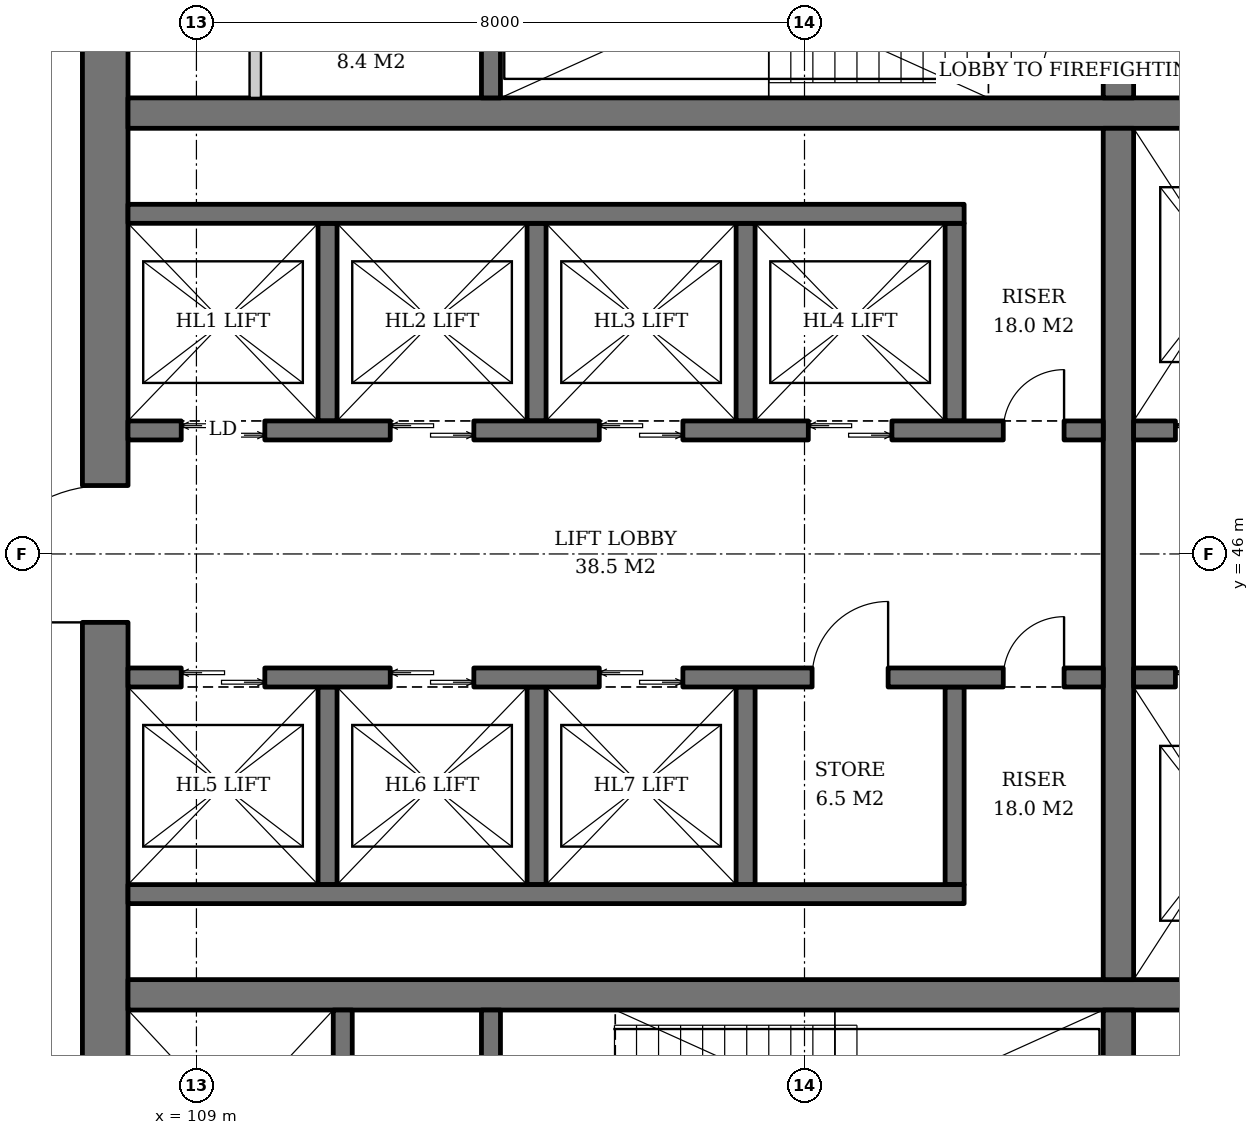
"""IFC4 building model, lengths in metres.
Left out: names, types, materials, properties, quantities, classifications, styles, units other than length and angle.
Written with IfcOpenShell. Run it as: python <this file> out.ifc"""

import sys

from ifc_helpers import new_model, si_unit, direction, frame, frame_2d, origin, place, context, subcontext, project, spatial, rectangle, extrude, element, fill, save


model = new_model("IFC4")
c1 = context("Model", 3, precision=1e-05, world=origin(), true_north=direction((0.0, 1.0)))
c2 = subcontext(c1, "Body", "Model", "MODEL_VIEW")
j1 = project(units=[si_unit("LENGTHUNIT", "METRE"), si_unit("PLANEANGLEUNIT", "RADIAN")], contexts=[c1])
p1 = place(None, origin())
s1 = spatial("IfcSite", under=j1, at=p1, CompositionType="ELEMENT")
p2 = place(p1, origin())
s2 = spatial("IfcBuilding", under=s1, at=p2, CompositionType="ELEMENT")
p3 = place(p2, frame((0.0, 0.0, 62.8)))
s3 = spatial("IfcBuildingStorey", under=s2, at=p3, CompositionType="ELEMENT", Elevation=62.8)
p4 = place(p3, frame((107.8, 37.1, 0.0), z_axis=(0.0, 0.0, 1.0), x_axis=(0.0, 1.0, 0.0)))
e1 = element("IfcWall", 1, at=p4, inside=s3, PredefinedType="SHEAR", context=c2, shape_type="SweptSolid", body=[
    extrude(rectangle(XDim=17.8, YDim=0.6, at=frame_2d((8.9, 0.0))), origin(), (0.0, 0.0, 1.0), 3.8),
])
p5 = place(p4, frame((8.0, 0.0, 0.0)))
e2 = element("IfcOpeningElement", 2, at=p5, cuts=e1, PredefinedType="OPENING", context=c2, shape_type="SweptSolid", body=[
    extrude(rectangle(XDim=1.8, YDim=2.4, at=frame_2d((0.9, 1.2))), frame((0.0, 0.31, 0.0), z_axis=(0.0, -1.0, 0.0), x_axis=(1.0, 0.0, 0.0)), (0.0, 0.0, 1.0), 0.62),
])
for number, where, z_axis, x_axis in (
    (3, (108.1, 40.2, 0.0), (0.0, 0.0, 1.0), (1.0, 0.0, 0.0)),
    (4, (108.1, 51.8, 0.0), (0.0, 0.0, 1.0), (1.0, 0.0, 0.0)),
):
    element("IfcWall", number, at=place(p3, frame(where, z_axis=z_axis, x_axis=x_axis)), inside=s3, PredefinedType="SHEAR", context=c2, shape_type="SweptSolid", body=[
        extrude(rectangle(XDim=17.8, YDim=0.4, at=frame_2d((8.9, 0.0))), origin(), (0.0, 0.0, 1.0), 3.8),
    ])
p6 = place(p3, frame((121.13, 37.1, 0.0), z_axis=(0.0, 0.0, 1.0), x_axis=(0.0, 1.0, 0.0)))
e5 = element("IfcWall", 5, at=p6, inside=s3, PredefinedType="SHEAR", context=c2, shape_type="SweptSolid", body=[
    extrude(rectangle(XDim=2.9, YDim=0.4, at=frame_2d((1.45, 0.0))), origin(), (0.0, 0.0, 1.0), 3.8),
])
p7 = place(p3, frame((121.13, 40.4, 0.0), z_axis=(0.0, 0.0, 1.0), x_axis=(0.0, 1.0, 0.0)))
e6 = element("IfcWall", 6, at=p7, inside=s3, PredefinedType="SHEAR", context=c2, shape_type="SweptSolid", body=[
    extrude(rectangle(XDim=11.2, YDim=0.4, at=frame_2d((5.6, 0.0))), origin(), (0.0, 0.0, 1.0), 3.8),
])
p8 = place(p3, frame((121.13, 52.0, 0.0), z_axis=(0.0, 0.0, 1.0), x_axis=(0.0, 1.0, 0.0)))
e7 = element("IfcWall", 7, at=p8, inside=s3, PredefinedType="SHEAR", context=c2, shape_type="SweptSolid", body=[
    extrude(rectangle(XDim=2.9, YDim=0.4, at=frame_2d((1.45, 0.0))), origin(), (0.0, 0.0, 1.0), 3.8),
])
p9 = place(p8, frame((0.3, 0.0, 0.0)))
e8 = element("IfcOpeningElement", 8, at=p9, cuts=e7, PredefinedType="OPENING", context=c2, shape_type="SweptSolid", body=[
    extrude(rectangle(XDim=1.0, YDim=2.1, at=frame_2d((0.5, 1.05))), frame((0.0, 0.21, 0.0), z_axis=(0.0, -1.0, 0.0), x_axis=(1.0, 0.0, 0.0)), (0.0, 0.0, 1.0), 0.42),
])
p10 = place(p3, frame((110.925, 37.1, 0.0), z_axis=(0.0, 0.0, 1.0), x_axis=(0.0, 1.0, 0.0)))
e9 = element("IfcWall", 9, at=p10, inside=s3, PredefinedType="SHEAR", context=c2, shape_type="SweptSolid", body=[
    extrude(rectangle(XDim=2.9, YDim=0.25, at=frame_2d((1.45, 0.0))), origin(), (0.0, 0.0, 1.0), 3.8),
])
p11 = place(p10, frame((0.8, 0.0, 0.0)))
e10 = element("IfcOpeningElement", 10, at=p11, cuts=e9, PredefinedType="OPENING", context=c2, shape_type="SweptSolid", body=[
    extrude(rectangle(XDim=1.3, YDim=2.2, at=frame_2d((0.65, 1.1))), frame((0.0, 0.135, 0.0), z_axis=(0.0, -1.0, 0.0), x_axis=(1.0, 0.0, 0.0)), (0.0, 0.0, 1.0), 0.27),
])
p12 = place(p3, frame((112.875, 37.1, 0.0), z_axis=(0.0, 0.0, 1.0), x_axis=(0.0, 1.0, 0.0)))
e11 = element("IfcWall", 11, at=p12, inside=s3, PredefinedType="SHEAR", context=c2, shape_type="SweptSolid", body=[
    extrude(rectangle(XDim=2.9, YDim=0.25, at=frame_2d((1.45, 0.0))), origin(), (0.0, 0.0, 1.0), 3.8),
])
p13 = place(p12, frame((0.75, 0.0, 0.0)))
e12 = element("IfcOpeningElement", 12, at=p13, cuts=e11, PredefinedType="OPENING", context=c2, shape_type="SweptSolid", body=[
    extrude(rectangle(XDim=1.2, YDim=2.1, at=frame_2d((0.6, 1.05))), frame((0.0, 0.135, 0.0), z_axis=(0.0, -1.0, 0.0), x_axis=(1.0, 0.0, 0.0)), (0.0, 0.0, 1.0), 0.27),
])
p14 = place(p3, frame((112.875, 52.0, 0.0), z_axis=(0.0, 0.0, 1.0), x_axis=(0.0, 1.0, 0.0)))
e13 = element("IfcWall", 13, at=p14, inside=s3, PredefinedType="SHEAR", context=c2, shape_type="SweptSolid", body=[
    extrude(rectangle(XDim=2.9, YDim=0.25, at=frame_2d((1.45, 0.0))), origin(), (0.0, 0.0, 1.0), 3.8),
])
for number, where, z_axis, x_axis in (
    (14, (110.725, 47.75, 0.0), (0.0, 0.0, 1.0), (0.0, 1.0, 0.0)),
    (15, (113.475, 47.75, 0.0), (0.0, 0.0, 1.0), (0.0, 1.0, 0.0)),
    (16, (116.225, 47.75, 0.0), (0.0, 0.0, 1.0), (0.0, 1.0, 0.0)),
    (17, (118.975, 47.75, 0.0), (0.0, 0.0, 1.0), (0.0, 1.0, 0.0)),
):
    element("IfcWall", number, at=place(p3, frame(where, z_axis=z_axis, x_axis=x_axis)), inside=s3, PredefinedType="SHEAR", context=c2, shape_type="SweptSolid", body=[
        extrude(rectangle(XDim=2.6, YDim=0.25, at=frame_2d((1.3, 0.0))), origin(), (0.0, 0.0, 1.0), 3.8),
    ])
p15 = place(p3, frame((108.1, 50.475, 0.0), z_axis=(0.0, 0.0, 1.0), x_axis=(1.0, 0.0, 0.0)))
e18 = element("IfcWall", 18, at=p15, inside=s3, PredefinedType="SHEAR", context=c2, shape_type="SweptSolid", body=[
    extrude(rectangle(XDim=11.0, YDim=0.25, at=frame_2d((5.5, 0.0))), origin(), (0.0, 0.0, 1.0), 3.8),
])
p16 = place(p3, frame((108.1, 47.625, 0.0), z_axis=(0.0, 0.0, 1.0), x_axis=(1.0, 0.0, 0.0)))
e19 = element("IfcWall", 19, at=p16, inside=s3, PredefinedType="SHEAR", context=c2, shape_type="SweptSolid", body=[
    extrude(rectangle(XDim=12.83, YDim=0.25, at=frame_2d((6.415, 0.0))), origin(), (0.0, 0.0, 1.0), 3.8),
])
p17 = place(p16, frame((0.7, 0.0, 0.0)))
e20 = element("IfcOpeningElement", 20, at=p17, cuts=e19, PredefinedType="OPENING", context=c2, shape_type="SweptSolid", body=[
    extrude(rectangle(XDim=1.1, YDim=2.2, at=frame_2d((0.55, 1.1))), frame((0.0, 0.135, 0.0), z_axis=(0.0, -1.0, 0.0), x_axis=(1.0, 0.0, 0.0)), (0.0, 0.0, 1.0), 0.27),
])
p18 = place(p16, frame((3.45, 0.0, 0.0)))
e21 = element("IfcOpeningElement", 21, at=p18, cuts=e19, PredefinedType="OPENING", context=c2, shape_type="SweptSolid", body=[
    extrude(rectangle(XDim=1.1, YDim=2.2, at=frame_2d((0.55, 1.1))), frame((0.0, 0.135, 0.0), z_axis=(0.0, -1.0, 0.0), x_axis=(1.0, 0.0, 0.0)), (0.0, 0.0, 1.0), 0.27),
])
p19 = place(p16, frame((6.2, 0.0, 0.0)))
e22 = element("IfcOpeningElement", 22, at=p19, cuts=e19, PredefinedType="OPENING", context=c2, shape_type="SweptSolid", body=[
    extrude(rectangle(XDim=1.1, YDim=2.2, at=frame_2d((0.55, 1.1))), frame((0.0, 0.135, 0.0), z_axis=(0.0, -1.0, 0.0), x_axis=(1.0, 0.0, 0.0)), (0.0, 0.0, 1.0), 0.27),
])
p20 = place(p16, frame((8.95, 0.0, 0.0)))
e23 = element("IfcOpeningElement", 23, at=p20, cuts=e19, PredefinedType="OPENING", context=c2, shape_type="SweptSolid", body=[
    extrude(rectangle(XDim=1.1, YDim=2.2, at=frame_2d((0.55, 1.1))), frame((0.0, 0.135, 0.0), z_axis=(0.0, -1.0, 0.0), x_axis=(1.0, 0.0, 0.0)), (0.0, 0.0, 1.0), 0.27),
])
p21 = place(p16, frame((11.515, 0.0, 0.0)))
e24 = element("IfcOpeningElement", 24, at=p21, cuts=e19, PredefinedType="OPENING", context=c2, shape_type="SweptSolid", body=[
    extrude(rectangle(XDim=0.8, YDim=2.0, at=frame_2d((0.4, 1.0))), frame((0.0, 0.135, 0.0), z_axis=(0.0, -1.0, 0.0), x_axis=(1.0, 0.0, 0.0)), (0.0, 0.0, 1.0), 0.27),
])
for number, where, z_axis, x_axis in (
    (25, (110.725, 44.25, 0.0), (0.0, 0.0, 1.0), (0.0, -1.0, 0.0)),
    (26, (113.475, 44.25, 0.0), (0.0, 0.0, 1.0), (0.0, -1.0, 0.0)),
    (27, (116.225, 44.25, 0.0), (0.0, 0.0, 1.0), (0.0, -1.0, 0.0)),
    (28, (118.975, 44.25, 0.0), (0.0, 0.0, 1.0), (0.0, -1.0, 0.0)),
):
    element("IfcWall", number, at=place(p3, frame(where, z_axis=z_axis, x_axis=x_axis)), inside=s3, PredefinedType="SHEAR", context=c2, shape_type="SweptSolid", body=[
        extrude(rectangle(XDim=2.6, YDim=0.25, at=frame_2d((1.3, 0.0))), origin(), (0.0, 0.0, 1.0), 3.8),
    ])
p22 = place(p3, frame((108.1, 41.525, 0.0), z_axis=(0.0, 0.0, 1.0), x_axis=(1.0, 0.0, 0.0)))
e29 = element("IfcWall", 29, at=p22, inside=s3, PredefinedType="SHEAR", context=c2, shape_type="SweptSolid", body=[
    extrude(rectangle(XDim=11.0, YDim=0.25, at=frame_2d((5.5, 0.0))), origin(), (0.0, 0.0, 1.0), 3.8),
])
p23 = place(p3, frame((108.1, 44.375, 0.0), z_axis=(0.0, 0.0, 1.0), x_axis=(1.0, 0.0, 0.0)))
e30 = element("IfcWall", 30, at=p23, inside=s3, PredefinedType="SHEAR", context=c2, shape_type="SweptSolid", body=[
    extrude(rectangle(XDim=12.83, YDim=0.25, at=frame_2d((6.415, 0.0))), origin(), (0.0, 0.0, 1.0), 3.8),
])
p24 = place(p23, frame((0.7, 0.0, 0.0)))
e31 = element("IfcOpeningElement", 31, at=p24, cuts=e30, PredefinedType="OPENING", context=c2, shape_type="SweptSolid", body=[
    extrude(rectangle(XDim=1.1, YDim=2.2, at=frame_2d((0.55, 1.1))), frame((0.0, 0.135, 0.0), z_axis=(0.0, -1.0, 0.0), x_axis=(1.0, 0.0, 0.0)), (0.0, 0.0, 1.0), 0.27),
])
p25 = place(p23, frame((3.45, 0.0, 0.0)))
e32 = element("IfcOpeningElement", 32, at=p25, cuts=e30, PredefinedType="OPENING", context=c2, shape_type="SweptSolid", body=[
    extrude(rectangle(XDim=1.1, YDim=2.2, at=frame_2d((0.55, 1.1))), frame((0.0, 0.135, 0.0), z_axis=(0.0, -1.0, 0.0), x_axis=(1.0, 0.0, 0.0)), (0.0, 0.0, 1.0), 0.27),
])
p26 = place(p23, frame((6.2, 0.0, 0.0)))
e33 = element("IfcOpeningElement", 33, at=p26, cuts=e30, PredefinedType="OPENING", context=c2, shape_type="SweptSolid", body=[
    extrude(rectangle(XDim=1.1, YDim=2.2, at=frame_2d((0.55, 1.1))), frame((0.0, 0.135, 0.0), z_axis=(0.0, -1.0, 0.0), x_axis=(1.0, 0.0, 0.0)), (0.0, 0.0, 1.0), 0.27),
])
p27 = place(p23, frame((9.0, 0.0, 0.0)))
e34 = element("IfcOpeningElement", 34, at=p27, cuts=e30, PredefinedType="OPENING", context=c2, shape_type="SweptSolid", body=[
    extrude(rectangle(XDim=1.0, YDim=2.1, at=frame_2d((0.5, 1.05))), frame((0.0, 0.135, 0.0), z_axis=(0.0, -1.0, 0.0), x_axis=(1.0, 0.0, 0.0)), (0.0, 0.0, 1.0), 0.27),
])
p28 = place(p23, frame((11.515, 0.0, 0.0)))
e35 = element("IfcOpeningElement", 35, at=p28, cuts=e30, PredefinedType="OPENING", context=c2, shape_type="SweptSolid", body=[
    extrude(rectangle(XDim=0.8, YDim=2.0, at=frame_2d((0.4, 1.0))), frame((0.0, 0.135, 0.0), z_axis=(0.0, -1.0, 0.0), x_axis=(1.0, 0.0, 0.0)), (0.0, 0.0, 1.0), 0.27),
])
p29 = place(p3, frame((121.33, 47.625, 0.0), z_axis=(0.0, 0.0, 1.0), x_axis=(1.0, 0.0, 0.0)))
e36 = element("IfcWall", 36, at=p29, inside=s3, PredefinedType="SHEAR", context=c2, shape_type="SweptSolid", body=[
    extrude(rectangle(XDim=4.57, YDim=0.25, at=frame_2d((2.285, 0.0))), origin(), (0.0, 0.0, 1.0), 3.8),
])
p30 = place(p29, frame((0.55, 0.0, 0.0)))
e37 = element("IfcOpeningElement", 37, at=p30, cuts=e36, PredefinedType="OPENING", context=c2, shape_type="SweptSolid", body=[
    extrude(rectangle(XDim=1.4, YDim=2.4, at=frame_2d((0.7, 1.2))), frame((0.0, 0.135, 0.0), z_axis=(0.0, -1.0, 0.0), x_axis=(1.0, 0.0, 0.0)), (0.0, 0.0, 1.0), 0.27),
])
p31 = place(p29, frame((3.26, 0.0, 0.0)))
e38 = element("IfcOpeningElement", 38, at=p31, cuts=e36, PredefinedType="OPENING", context=c2, shape_type="SweptSolid", body=[
    extrude(rectangle(XDim=0.8, YDim=2.0, at=frame_2d((0.4, 1.0))), frame((0.0, 0.135, 0.0), z_axis=(0.0, -1.0, 0.0), x_axis=(1.0, 0.0, 0.0)), (0.0, 0.0, 1.0), 0.27),
])
p32 = place(p3, frame((121.33, 44.375, 0.0), z_axis=(0.0, 0.0, 1.0), x_axis=(1.0, 0.0, 0.0)))
e39 = element("IfcWall", 39, at=p32, inside=s3, PredefinedType="SHEAR", context=c2, shape_type="SweptSolid", body=[
    extrude(rectangle(XDim=4.57, YDim=0.25, at=frame_2d((2.285, 0.0))), origin(), (0.0, 0.0, 1.0), 3.8),
])
p33 = place(p32, frame((0.55, 0.0, 0.0)))
e40 = element("IfcOpeningElement", 40, at=p33, cuts=e39, PredefinedType="OPENING", context=c2, shape_type="SweptSolid", body=[
    extrude(rectangle(XDim=1.4, YDim=2.4, at=frame_2d((0.7, 1.2))), frame((0.0, 0.135, 0.0), z_axis=(0.0, -1.0, 0.0), x_axis=(1.0, 0.0, 0.0)), (0.0, 0.0, 1.0), 0.27),
])
p34 = place(p32, frame((3.26, 0.0, 0.0)))
e41 = element("IfcOpeningElement", 41, at=p34, cuts=e39, PredefinedType="OPENING", context=c2, shape_type="SweptSolid", body=[
    extrude(rectangle(XDim=0.8, YDim=2.0, at=frame_2d((0.4, 1.0))), frame((0.0, 0.135, 0.0), z_axis=(0.0, -1.0, 0.0), x_axis=(1.0, 0.0, 0.0)), (0.0, 0.0, 1.0), 0.27),
])
p35 = place(p3, frame((109.774, 52.0, 0.0), z_axis=(0.0, 0.0, 1.0), x_axis=(0.0, 1.0, 0.0)))
e42 = element("IfcWall", 42, at=p35, inside=s3, PredefinedType="SOLIDWALL", context=c2, shape_type="SweptSolid", body=[
    extrude(rectangle(XDim=2.9, YDim=0.15, at=frame_2d((1.45, 0.0))), origin(), (0.0, 0.0, 1.0), 3.6),
])
p36 = place(p17, origin())
e43 = element("IfcDoor", 43, at=p36, inside=s3, OperationType="DOUBLE_DOOR_SLIDING", PredefinedType="DOOR", context=c2, shape_type="SweptSolid", body=[
    extrude(rectangle(XDim=1.1, YDim=2.2, at=frame_2d((0.55, 1.1))), frame((0.0, 0.025, 0.0), z_axis=(0.0, -1.0, 0.0), x_axis=(1.0, 0.0, 0.0)), (0.0, 0.0, 1.0), 0.05),
])
fill(e20, e43)
p37 = place(p18, origin())
e44 = element("IfcDoor", 44, at=p37, inside=s3, OperationType="DOUBLE_DOOR_SLIDING", PredefinedType="DOOR", context=c2, shape_type="SweptSolid", body=[
    extrude(rectangle(XDim=1.1, YDim=2.2, at=frame_2d((0.55, 1.1))), frame((0.0, 0.025, 0.0), z_axis=(0.0, -1.0, 0.0), x_axis=(1.0, 0.0, 0.0)), (0.0, 0.0, 1.0), 0.05),
])
fill(e21, e44)
p38 = place(p19, origin())
e45 = element("IfcDoor", 45, at=p38, inside=s3, OperationType="DOUBLE_DOOR_SLIDING", PredefinedType="DOOR", context=c2, shape_type="SweptSolid", body=[
    extrude(rectangle(XDim=1.1, YDim=2.2, at=frame_2d((0.55, 1.1))), frame((0.0, 0.025, 0.0), z_axis=(0.0, -1.0, 0.0), x_axis=(1.0, 0.0, 0.0)), (0.0, 0.0, 1.0), 0.05),
])
fill(e22, e45)
p39 = place(p20, origin())
e46 = element("IfcDoor", 46, at=p39, inside=s3, OperationType="DOUBLE_DOOR_SLIDING", PredefinedType="DOOR", context=c2, shape_type="SweptSolid", body=[
    extrude(rectangle(XDim=1.1, YDim=2.2, at=frame_2d((0.55, 1.1))), frame((0.0, 0.025, 0.0), z_axis=(0.0, -1.0, 0.0), x_axis=(1.0, 0.0, 0.0)), (0.0, 0.0, 1.0), 0.05),
])
fill(e23, e46)
p40 = place(p21, origin())
e47 = element("IfcDoor", 47, at=p40, inside=s3, OperationType="SINGLE_SWING_RIGHT", PredefinedType="DOOR", context=c2, shape_type="SweptSolid", body=[
    extrude(rectangle(XDim=0.8, YDim=2.0, at=frame_2d((0.4, 1.0))), frame((0.0, 0.025, 0.0), z_axis=(0.0, -1.0, 0.0), x_axis=(1.0, 0.0, 0.0)), (0.0, 0.0, 1.0), 0.05),
])
fill(e24, e47)
p41 = place(p24, origin())
e48 = element("IfcDoor", 48, at=p41, inside=s3, OperationType="DOUBLE_DOOR_SLIDING", PredefinedType="DOOR", context=c2, shape_type="SweptSolid", body=[
    extrude(rectangle(XDim=1.1, YDim=2.2, at=frame_2d((0.55, 1.1))), frame((0.0, 0.025, 0.0), z_axis=(0.0, -1.0, 0.0), x_axis=(1.0, 0.0, 0.0)), (0.0, 0.0, 1.0), 0.05),
])
fill(e31, e48)
p42 = place(p25, origin())
e49 = element("IfcDoor", 49, at=p42, inside=s3, OperationType="DOUBLE_DOOR_SLIDING", PredefinedType="DOOR", context=c2, shape_type="SweptSolid", body=[
    extrude(rectangle(XDim=1.1, YDim=2.2, at=frame_2d((0.55, 1.1))), frame((0.0, 0.025, 0.0), z_axis=(0.0, -1.0, 0.0), x_axis=(1.0, 0.0, 0.0)), (0.0, 0.0, 1.0), 0.05),
])
fill(e32, e49)
p43 = place(p26, origin())
e50 = element("IfcDoor", 50, at=p43, inside=s3, OperationType="DOUBLE_DOOR_SLIDING", PredefinedType="DOOR", context=c2, shape_type="SweptSolid", body=[
    extrude(rectangle(XDim=1.1, YDim=2.2, at=frame_2d((0.55, 1.1))), frame((0.0, 0.025, 0.0), z_axis=(0.0, -1.0, 0.0), x_axis=(1.0, 0.0, 0.0)), (0.0, 0.0, 1.0), 0.05),
])
fill(e33, e50)
p44 = place(p27, origin())
e51 = element("IfcDoor", 51, at=p44, inside=s3, OperationType="SINGLE_SWING_RIGHT", PredefinedType="DOOR", context=c2, shape_type="SweptSolid", body=[
    extrude(rectangle(XDim=1.0, YDim=2.1, at=frame_2d((0.5, 1.05))), frame((0.0, 0.025, 0.0), z_axis=(0.0, -1.0, 0.0), x_axis=(1.0, 0.0, 0.0)), (0.0, 0.0, 1.0), 0.05),
])
fill(e34, e51)
p45 = place(p28, origin())
e52 = element("IfcDoor", 52, at=p45, inside=s3, OperationType="SINGLE_SWING_RIGHT", PredefinedType="DOOR", context=c2, shape_type="SweptSolid", body=[
    extrude(rectangle(XDim=0.8, YDim=2.0, at=frame_2d((0.4, 1.0))), frame((0.0, 0.025, 0.0), z_axis=(0.0, -1.0, 0.0), x_axis=(1.0, 0.0, 0.0)), (0.0, 0.0, 1.0), 0.05),
])
fill(e35, e52)
p46 = place(p30, origin())
e53 = element("IfcDoor", 53, at=p46, inside=s3, OperationType="DOUBLE_DOOR_SLIDING", PredefinedType="DOOR", context=c2, shape_type="SweptSolid", body=[
    extrude(rectangle(XDim=1.4, YDim=2.4, at=frame_2d((0.7, 1.2))), frame((0.0, 0.025, 0.0), z_axis=(0.0, -1.0, 0.0), x_axis=(1.0, 0.0, 0.0)), (0.0, 0.0, 1.0), 0.05),
])
fill(e37, e53)
p47 = place(p33, origin())
e54 = element("IfcDoor", 54, at=p47, inside=s3, OperationType="DOUBLE_DOOR_SLIDING", PredefinedType="DOOR", context=c2, shape_type="SweptSolid", body=[
    extrude(rectangle(XDim=1.4, YDim=2.4, at=frame_2d((0.7, 1.2))), frame((0.0, 0.025, 0.0), z_axis=(0.0, -1.0, 0.0), x_axis=(1.0, 0.0, 0.0)), (0.0, 0.0, 1.0), 0.05),
])
fill(e40, e54)
p48 = place(p9, origin())
e55 = element("IfcDoor", 55, at=p48, inside=s3, OperationType="SINGLE_SWING_LEFT", PredefinedType="DOOR", context=c2, shape_type="SweptSolid", body=[
    extrude(rectangle(XDim=1.0, YDim=2.1, at=frame_2d((0.5, 1.05))), frame((0.0, 0.025, 0.0), z_axis=(0.0, -1.0, 0.0), x_axis=(1.0, 0.0, 0.0)), (0.0, 0.0, 1.0), 0.05),
])
fill(e8, e55)
p49 = place(p5, origin())
e56 = element("IfcDoor", 56, at=p49, inside=s3, OperationType="DOUBLE_DOOR_SINGLE_SWING", PredefinedType="DOOR", context=c2, shape_type="SweptSolid", body=[
    extrude(rectangle(XDim=1.8, YDim=2.4, at=frame_2d((0.9, 1.2))), frame((0.0, 0.025, 0.0), z_axis=(0.0, -1.0, 0.0), x_axis=(1.0, 0.0, 0.0)), (0.0, 0.0, 1.0), 0.05),
])
fill(e2, e56)
save(model, sys.argv[1])
